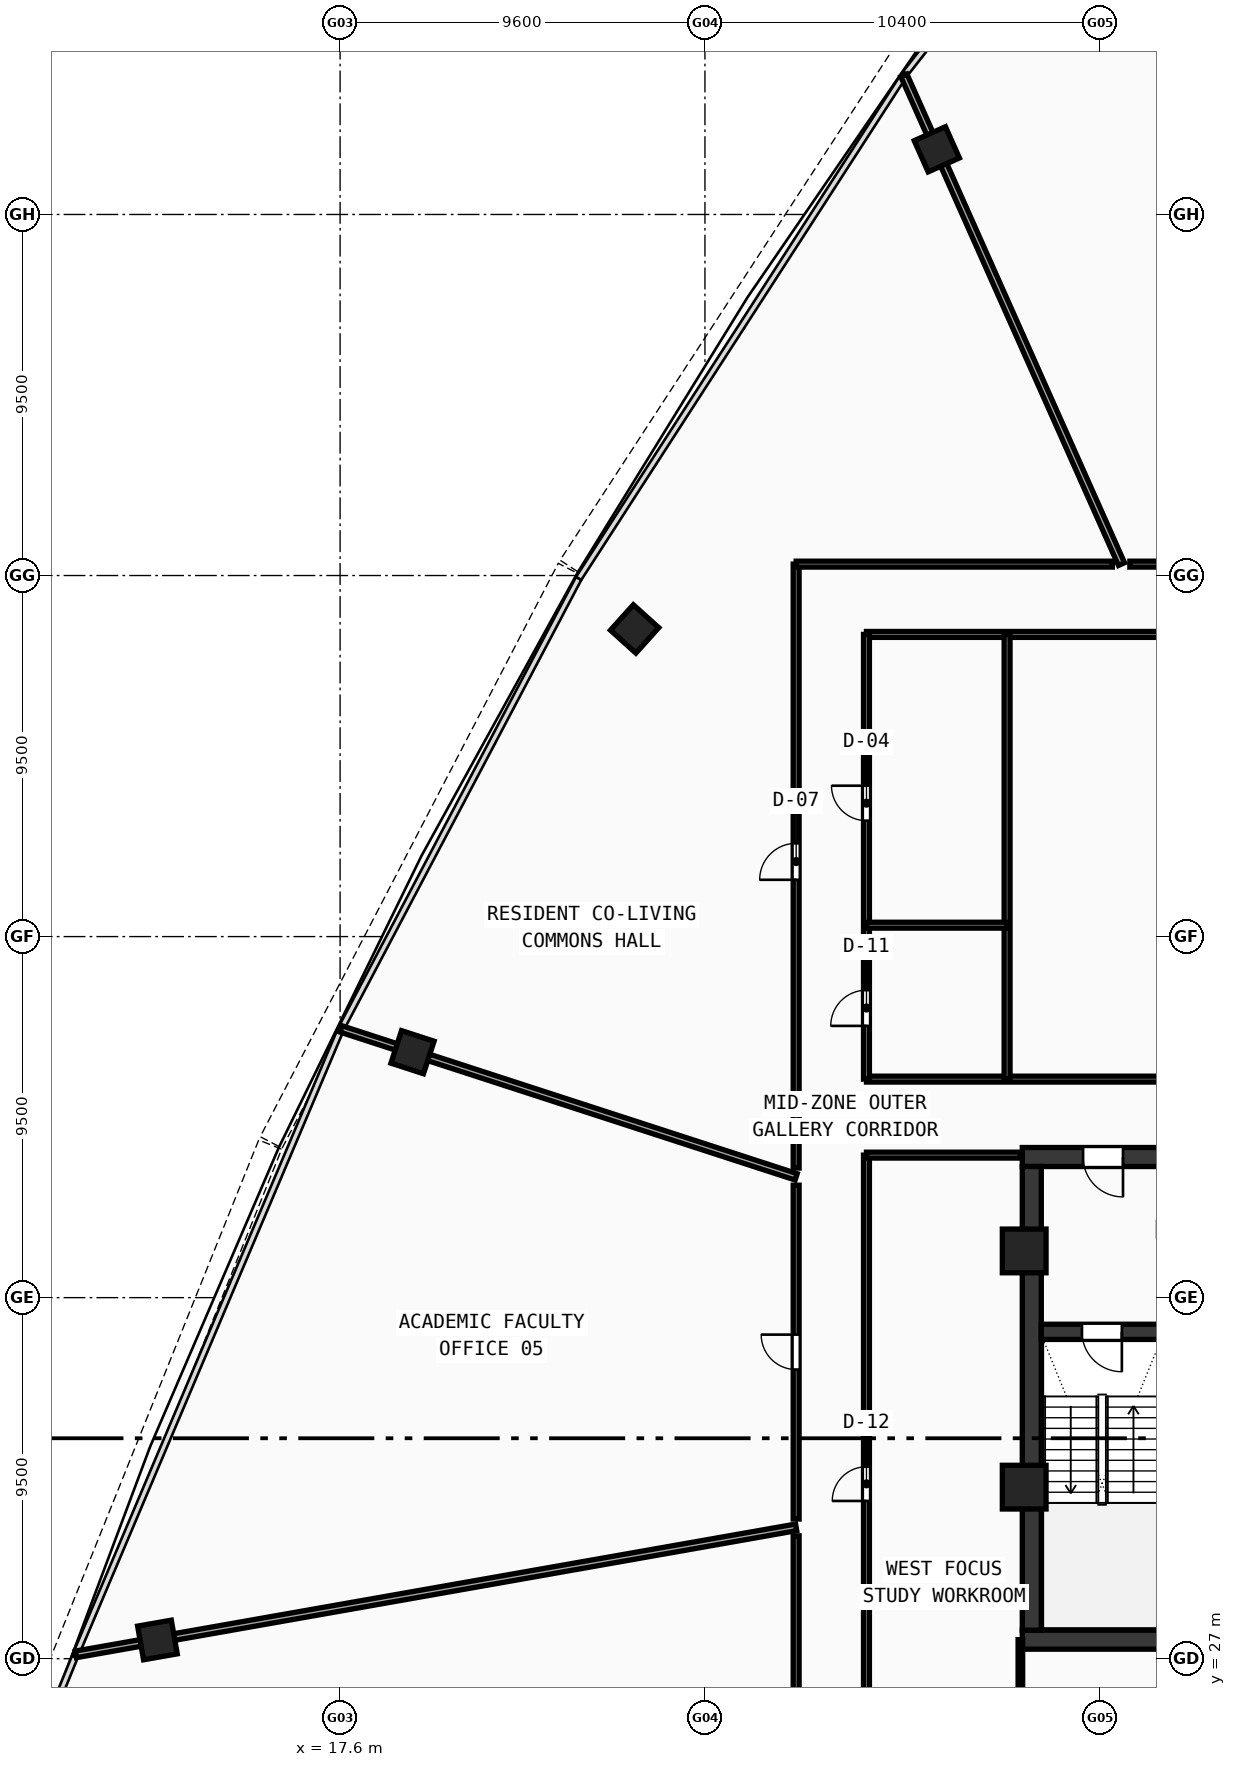
"""IFC4 building model, lengths in metres.
Left out: names, types, materials, properties, quantities, classifications, styles, units other than length and angle.
Written with IfcOpenShell. Run it as: python <this file> out.ifc"""

import sys

from ifc_helpers import new_model, si_unit, direction, frame, frame_2d, origin, origin_with_axes, origin_2d, place, context, subcontext, project, spatial, rectangle, hollow_rectangle, extrude, source, transform, mapped, element, fill, save


model = new_model("IFC4")
c1 = context("Model", 3, precision=1e-05, world=origin(), true_north=direction((0.0, 1.0)))
c2 = subcontext(c1, "Body", "Model", "MODEL_VIEW")
j1 = project(units=[si_unit("LENGTHUNIT", "METRE"), si_unit("PLANEANGLEUNIT", "RADIAN")], contexts=[c1])
p1 = place(None, origin())
s1 = spatial("IfcSite", under=j1, at=p1, CompositionType="ELEMENT")
p2 = place(p1, origin())
s2 = spatial("IfcBuilding", under=s1, at=p2, CompositionType="ELEMENT")
p3 = place(p2, frame((0.0, 0.0, 199.96)))
s3 = spatial("IfcBuildingStorey", under=s2, at=p3, CompositionType="ELEMENT", Elevation=199.96)
p4 = place(p3, frame((35.55, 27.5, 0.0), z_axis=(0.0, 0.0, 1.0), x_axis=(1.0, 0.0, 0.0)))
e1 = element("IfcWall", 1, at=p4, inside=s3, PredefinedType="SHEAR", context=c2, shape_type="SweptSolid", body=[
    extrude(rectangle(XDim=24.9, YDim=0.5, at=frame_2d((12.45, 0.0))), origin(), (0.0, 0.0, 1.0), 3.54),
])
p5 = place(p3, frame((35.55, 40.2, 0.0), z_axis=(0.0, 0.0, 1.0), x_axis=(1.0, 0.0, 0.0)))
e2 = element("IfcWall", 2, at=p5, inside=s3, PredefinedType="SHEAR", context=c2, shape_type="SweptSolid", body=[
    extrude(rectangle(XDim=11.25, YDim=0.5, at=frame_2d((5.625, 0.0))), origin(), (0.0, 0.0, 1.0), 3.54),
])
p6 = place(p5, frame((1.6, 0.0, 0.0)))
e3 = element("IfcOpeningElement", 3, at=p6, cuts=e2, PredefinedType="OPENING", context=c2, shape_type="SweptSolid", body=[
    extrude(rectangle(XDim=1.05, YDim=2.1, at=frame_2d((0.525, 1.05))), frame((0.0, 0.26, 0.0), z_axis=(0.0, -1.0, 0.0), x_axis=(1.0, 0.0, 0.0)), (0.0, 0.0, 1.0), 0.52),
])
p7 = place(p3, frame((35.8, 27.75, 0.0), z_axis=(0.0, 0.0, 1.0), x_axis=(0.0, 1.0, 0.0)))
e4 = element("IfcWall", 4, at=p7, inside=s3, PredefinedType="SHEAR", context=c2, shape_type="SweptSolid", body=[
    extrude(rectangle(XDim=12.2, YDim=0.5, at=frame_2d((6.1, 0.0))), origin(), (0.0, 0.0, 1.0), 3.54),
])
p8 = place(p3, frame((36.05, 35.6, 0.0), z_axis=(0.0, 0.0, 1.0), x_axis=(1.0, 0.0, 0.0)))
e5 = element("IfcWall", 5, at=p8, inside=s3, PredefinedType="SHEAR", context=c2, shape_type="SweptSolid", body=[
    extrude(rectangle(XDim=3.15, YDim=0.4, at=frame_2d((1.575, 0.0))), origin(), (0.0, 0.0, 1.0), 3.54),
])
p9 = place(p8, frame((1.07, 0.0, 0.0)))
e6 = element("IfcOpeningElement", 6, at=p9, cuts=e5, PredefinedType="OPENING", context=c2, shape_type="SweptSolid", body=[
    extrude(rectangle(XDim=1.05, YDim=2.1, at=frame_2d((0.525, 1.05))), frame((0.0, 0.21, 0.0), z_axis=(0.0, -1.0, 0.0), x_axis=(1.0, 0.0, 0.0)), (0.0, 0.0, 1.0), 0.42),
])
m1 = source(origin(), c2, "Body", "SweptSolid", [
    extrude(hollow_rectangle(XDim=1.15, YDim=1.15, WallThickness=0.048, at=origin_2d()), origin(), (0.0, 0.0, 1.0), 3.8),
])
for number, where, z_axis, x_axis in (
    (7, (35.6, 37.729, -0.26), (0.0, 0.0, 1.0), (1.0, 0.0, 0.0)),
    (8, (35.6, 31.513, -0.26), (0.0, 0.0, 1.0), (1.0, 0.0, 0.0)),
):
    element("IfcColumn", number, at=place(p3, frame(where, z_axis=z_axis, x_axis=x_axis)), inside=s3, PredefinedType="COLUMN", context=c2, shape_type="MappedRepresentation", body=[
        mapped(m1, transform((0.0, 0.0, 0.0), scale=1.0)),
    ])
m2 = source(origin(), c2, "Body", "SweptSolid", [
    extrude(hollow_rectangle(XDim=0.9, YDim=0.9, WallThickness=0.036, at=origin_2d()), origin(), (0.0, 0.0, 1.0), 3.8),
])
for number, where, z_axis, x_axis in (
    (9, (33.301, 66.715, -0.26), (0.0, 0.0, 1.0), (-0.914, -0.407, 0.0)),
    (10, (25.349, 54.095, -0.26), (0.0, 0.0, 1.0), (-0.669, -0.743, 0.0)),
    (11, (19.505, 42.958, -0.26), (0.0, 0.0, 1.0), (-0.309, -0.951, 0.0)),
    (12, (12.793, 27.492, -0.26), (0.0, 0.0, 1.0), (0.174, -0.985, 0.0)),
):
    element("IfcColumn", number, at=place(p3, frame(where, z_axis=z_axis, x_axis=x_axis)), inside=s3, PredefinedType="COLUMN", context=c2, shape_type="MappedRepresentation", body=[
        mapped(m2, transform((0.0, 0.0, 0.0), scale=1.0)),
    ])
p10 = place(p3, frame((31.45, 42.25, 0.0), z_axis=(0.0, 0.0, 1.0), x_axis=(1.0, 0.0, 0.0)))
e13 = element("IfcWall", 13, at=p10, inside=s3, PredefinedType="PARTITIONING", context=c2, shape_type="SweptSolid", body=[
    extrude(rectangle(XDim=33.1, YDim=0.155, at=frame_2d((16.55, 0.0))), origin(), (0.0, 0.0, 1.0), 2.89),
])
p11 = place(p3, frame((31.45, 53.95, 0.0), z_axis=(0.0, 0.0, 1.0), x_axis=(1.0, 0.0, 0.0)))
e14 = element("IfcWall", 14, at=p11, inside=s3, PredefinedType="PARTITIONING", context=c2, shape_type="SweptSolid", body=[
    extrude(rectangle(XDim=33.1, YDim=0.155, at=frame_2d((16.55, 0.0))), origin(), (0.0, 0.0, 1.0), 2.89),
])
p12 = place(p11, frame((8.0, 0.0, 0.0)))
e15 = element("IfcOpeningElement", 15, at=p12, cuts=e14, PredefinedType="OPENING", context=c2, shape_type="SweptSolid", body=[
    extrude(rectangle(XDim=0.92, YDim=2.1, at=frame_2d((0.46, 1.05))), frame((0.0, 0.087, 0.0), z_axis=(0.0, -1.0, 0.0), x_axis=(1.0, 0.0, 0.0)), (0.0, 0.0, 1.0), 0.175),
])
p13 = place(p11, frame((26.05, 0.0, 0.0)))
e16 = element("IfcOpeningElement", 16, at=p13, cuts=e14, PredefinedType="OPENING", context=c2, shape_type="SweptSolid", body=[
    extrude(rectangle(XDim=0.92, YDim=2.1, at=frame_2d((0.46, 1.05))), frame((0.0, 0.087, 0.0), z_axis=(0.0, -1.0, 0.0), x_axis=(1.0, 0.0, 0.0)), (0.0, 0.0, 1.0), 0.175),
])
p14 = place(p3, frame((31.45, 42.25, 0.0), z_axis=(0.0, 0.0, 1.0), x_axis=(0.0, 1.0, 0.0)))
e17 = element("IfcWall", 17, at=p14, inside=s3, PredefinedType="PARTITIONING", context=c2, shape_type="SweptSolid", body=[
    extrude(rectangle(XDim=11.7, YDim=0.155, at=frame_2d((5.85, 0.0))), origin(), (0.0, 0.0, 1.0), 2.89),
])
p15 = place(p14, frame((1.4, 0.0, 0.0)))
e18 = element("IfcOpeningElement", 18, at=p15, cuts=e17, PredefinedType="OPENING", context=c2, shape_type="SweptSolid", body=[
    extrude(rectangle(XDim=0.94, YDim=2.1, at=frame_2d((0.47, 1.05))), frame((0.0, 0.087, 0.0), z_axis=(0.0, -1.0, 0.0), x_axis=(1.0, 0.0, 0.0)), (0.0, 0.0, 1.0), 0.175),
])
p16 = place(p14, frame((6.8, 0.0, 0.0)))
e19 = element("IfcOpeningElement", 19, at=p16, cuts=e17, PredefinedType="OPENING", context=c2, shape_type="SweptSolid", body=[
    extrude(rectangle(XDim=0.92, YDim=2.1, at=frame_2d((0.46, 1.05))), frame((0.0, 0.087, 0.0), z_axis=(0.0, -1.0, 0.0), x_axis=(1.0, 0.0, 0.0)), (0.0, 0.0, 1.0), 0.175),
])
p17 = place(p3, frame((35.15, 42.25, 0.0), z_axis=(0.0, 0.0, 1.0), x_axis=(0.0, 1.0, 0.0)))
e20 = element("IfcWall", 20, at=p17, inside=s3, PredefinedType="PARTITIONING", context=c2, shape_type="SweptSolid", body=[
    extrude(rectangle(XDim=11.7, YDim=0.155, at=frame_2d((5.85, 0.0))), origin(), (0.0, 0.0, 1.0), 2.89),
])
p18 = place(p3, frame((31.45, 46.3, 0.0), z_axis=(0.0, 0.0, 1.0), x_axis=(1.0, 0.0, 0.0)))
e21 = element("IfcWall", 21, at=p18, inside=s3, PredefinedType="PARTITIONING", context=c2, shape_type="SweptSolid", body=[
    extrude(rectangle(XDim=3.7, YDim=0.155, at=frame_2d((1.85, 0.0))), origin(), (0.0, 0.0, 1.0), 2.89),
])
p19 = place(p3, frame((31.45, 23.65, 0.0), z_axis=(0.0, 0.0, 1.0), x_axis=(0.0, 1.0, 0.0)))
e22 = element("IfcWall", 22, at=p19, inside=s3, PredefinedType="PARTITIONING", context=c2, shape_type="SweptSolid", body=[
    extrude(rectangle(XDim=16.6, YDim=0.155, at=frame_2d((8.3, 0.0))), origin(), (0.0, 0.0, 1.0), 2.89),
])
p20 = place(p19, frame((7.5, 0.0, 0.0)))
e23 = element("IfcOpeningElement", 23, at=p20, cuts=e22, PredefinedType="OPENING", context=c2, shape_type="SweptSolid", body=[
    extrude(rectangle(XDim=0.9, YDim=2.08, at=frame_2d((0.45, 1.04))), frame((0.0, 0.087, 0.0), z_axis=(0.0, -1.0, 0.0), x_axis=(1.0, 0.0, 0.0)), (0.0, 0.0, 1.0), 0.175),
])
p21 = place(p3, frame((31.45, 40.25, 0.0), z_axis=(0.0, 0.0, 1.0), x_axis=(1.0, 0.0, 0.0)))
e24 = element("IfcWall", 24, at=p21, inside=s3, PredefinedType="PARTITIONING", context=c2, shape_type="SweptSolid", body=[
    extrude(rectangle(XDim=4.05, YDim=0.155, at=frame_2d((2.025, 0.0))), origin(), (0.0, 0.0, 1.0), 3.54),
])
p22 = place(p3, frame((35.5, 23.65, 0.0), z_axis=(0.0, 0.0, 1.0), x_axis=(0.0, 1.0, 0.0)))
e25 = element("IfcWall", 25, at=p22, inside=s3, PredefinedType="PARTITIONING", context=c2, shape_type="SweptSolid", body=[
    extrude(rectangle(XDim=3.85, YDim=0.12, at=frame_2d((1.925, 0.0))), origin(), (0.0, 0.0, 1.0), 3.14),
])
p23 = place(p3, frame((38.16, 55.8, 0.0), z_axis=(0.0, 0.0, 1.0), x_axis=(-0.406725691424, 0.913550333554, 0.0)))
e26 = element("IfcWall", 26, at=p23, inside=s3, PredefinedType="PARTITIONING", context=c2, shape_type="SweptSolid", body=[
    extrude(rectangle(XDim=14.078, YDim=0.175, at=frame_2d((7.039, 0.0))), origin(), (0.0, 0.0, 1.0), 2.89),
])
p24 = place(p3, frame((29.6, 39.678, 0.0), z_axis=(0.0, 0.0, 1.0), x_axis=(-0.951056149915, 0.309018121975, 0.0)))
e27 = element("IfcWall", 27, at=p24, inside=s3, PredefinedType="PARTITIONING", context=c2, shape_type="SweptSolid", body=[
    extrude(rectangle(XDim=12.593, YDim=0.175, at=frame_2d((6.296, 0.0))), origin(), (0.0, 0.0, 1.0), 2.89),
])
p25 = place(p3, frame((29.6, 30.456, 0.0), z_axis=(0.0, 0.0, 1.0), x_axis=(-0.984807685374, -0.173648561263, 0.0)))
e28 = element("IfcWall", 28, at=p25, inside=s3, PredefinedType="PARTITIONING", context=c2, shape_type="SweptSolid", body=[
    extrude(rectangle(XDim=19.246, YDim=0.175, at=frame_2d((9.623, 0.0))), origin(), (0.0, 0.0, 1.0), 2.89),
])
p26 = place(p3, frame((29.6, 21.8, 0.0), z_axis=(0.0, 0.0, 1.0), x_axis=(0.0, 1.0, 0.0)))
e29 = element("IfcWall", 29, at=p26, inside=s3, PredefinedType="PARTITIONING", context=c2, shape_type="SweptSolid", body=[
    extrude(rectangle(XDim=8.432, YDim=0.155, at=frame_2d((4.216, 0.0))), origin(), (0.0, 0.0, 1.0), 3.14),
])
p27 = place(p3, frame((29.6, 30.675, 0.0), z_axis=(0.0, 0.0, 1.0), x_axis=(0.0, 1.0, 0.0)))
e30 = element("IfcWall", 30, at=p27, inside=s3, PredefinedType="PARTITIONING", context=c2, shape_type="SweptSolid", body=[
    extrude(rectangle(XDim=8.783, YDim=0.155, at=frame_2d((4.392, 0.0))), origin(), (0.0, 0.0, 1.0), 3.14),
])
p28 = place(p27, frame((3.932, 0.0, 0.0)))
e31 = element("IfcOpeningElement", 31, at=p28, cuts=e30, PredefinedType="OPENING", context=c2, shape_type="SweptSolid", body=[
    extrude(rectangle(XDim=0.92, YDim=2.1, at=frame_2d((0.46, 1.05))), frame((0.0, 0.087, 0.0), z_axis=(0.0, -1.0, 0.0), x_axis=(1.0, 0.0, 0.0)), (0.0, 0.0, 1.0), 0.175),
])
p29 = place(p3, frame((29.6, 39.91, 0.0), z_axis=(0.0, 0.0, 1.0), x_axis=(0.0, 1.0, 0.0)))
e32 = element("IfcWall", 32, at=p29, inside=s3, PredefinedType="PARTITIONING", context=c2, shape_type="SweptSolid", body=[
    extrude(rectangle(XDim=15.89, YDim=0.155, at=frame_2d((7.945, 0.0))), origin(), (0.0, 0.0, 1.0), 2.89),
])
p30 = place(p29, frame((7.584, 0.0, 0.0)))
e33 = element("IfcOpeningElement", 33, at=p30, cuts=e32, PredefinedType="OPENING", context=c2, shape_type="SweptSolid", body=[
    extrude(rectangle(XDim=0.96, YDim=2.12, at=frame_2d((0.48, 1.06))), frame((0.0, 0.087, 0.0), z_axis=(0.0, -1.0, 0.0), x_axis=(1.0, 0.0, 0.0)), (0.0, 0.0, 1.0), 0.175),
])
p31 = place(p3, frame((29.6, 55.8, 0.0), z_axis=(0.0, 0.0, 1.0), x_axis=(1.0, 0.0, 0.0)))
e34 = element("IfcWall", 34, at=p31, inside=s3, PredefinedType="PARTITIONING", context=c2, shape_type="SweptSolid", body=[
    extrude(rectangle(XDim=8.32, YDim=0.155, at=frame_2d((4.16, 0.0))), origin(), (0.0, 0.0, 1.0), 3.14),
])
p32 = place(p3, frame((38.38, 55.8, 0.0), z_axis=(0.0, 0.0, 1.0), x_axis=(1.0, 0.0, 0.0)))
e35 = element("IfcWall", 35, at=p32, inside=s3, PredefinedType="PARTITIONING", context=c2, shape_type="SweptSolid", body=[
    extrude(rectangle(XDim=5.329, YDim=0.155, at=frame_2d((2.665, 0.0))), origin(), (0.0, 0.0, 1.0), 2.89),
])
p33 = place(p32, frame((2.13, 0.0, 0.0)))
e36 = element("IfcOpeningElement", 36, at=p33, cuts=e35, PredefinedType="OPENING", context=c2, shape_type="SweptSolid", body=[
    extrude(rectangle(XDim=0.92, YDim=2.1, at=frame_2d((0.46, 1.05))), frame((0.0, 0.087, 0.0), z_axis=(0.0, -1.0, 0.0), x_axis=(1.0, 0.0, 0.0)), (0.0, 0.0, 1.0), 0.175),
])
m3 = source(origin(), c2, "Body", "SweptSolid", [
    extrude(rectangle(XDim=1.05, YDim=2.1, at=frame_2d((0.525, 1.05))), frame((0.0, 0.025, 0.0), z_axis=(0.0, -1.0, 0.0), x_axis=(1.0, 0.0, 0.0)), (0.0, 0.0, 1.0), 0.05),
])
p34 = place(p9, frame((1.05, 0.0, 0.0), z_axis=(0.0, 0.0, 1.0), x_axis=(-1.0, 0.0, 0.0)))
e37 = element("IfcDoor", 37, at=p34, inside=s3, OperationType="SINGLE_SWING_LEFT", PredefinedType="DOOR", context=c2, shape_type="MappedRepresentation", body=[
    mapped(m3, transform((0.0, 0.0, 0.0), scale=1.0)),
])
fill(e6, e37)
p35 = place(p6, frame((1.05, 0.0, 0.0), z_axis=(0.0, 0.0, 1.0), x_axis=(-1.0, 0.0, 0.0)))
e38 = element("IfcDoor", 38, at=p35, inside=s3, OperationType="SINGLE_SWING_LEFT", PredefinedType="DOOR", context=c2, shape_type="MappedRepresentation", body=[
    mapped(m3, transform((0.0, 0.0, 0.0), scale=1.0)),
])
fill(e3, e38)
m4 = source(origin(), c2, "Body", "SweptSolid", [
    extrude(rectangle(XDim=0.94, YDim=2.1, at=frame_2d((0.47, 1.05))), frame((0.0, 0.025, 0.0), z_axis=(0.0, -1.0, 0.0), x_axis=(1.0, 0.0, 0.0)), (0.0, 0.0, 1.0), 0.05),
])
p36 = place(p15, origin_with_axes())
e39 = element("IfcDoor", 39, at=p36, inside=s3, OperationType="SINGLE_SWING_LEFT", PredefinedType="DOOR", context=c2, shape_type="MappedRepresentation", body=[
    mapped(m4, transform((0.0, 0.0, 0.0), scale=1.0)),
])
fill(e18, e39)
m5 = source(origin(), c2, "Body", "SweptSolid", [
    extrude(rectangle(XDim=0.92, YDim=2.1, at=frame_2d((0.46, 1.05))), frame((0.0, 0.025, 0.0), z_axis=(0.0, -1.0, 0.0), x_axis=(1.0, 0.0, 0.0)), (0.0, 0.0, 1.0), 0.05),
])
p37 = place(p16, origin_with_axes())
e40 = element("IfcDoor", 40, at=p37, inside=s3, OperationType="SINGLE_SWING_RIGHT", PredefinedType="DOOR", context=c2, shape_type="MappedRepresentation", body=[
    mapped(m5, transform((0.0, 0.0, 0.0), scale=1.0)),
])
fill(e19, e40)
m6 = source(origin(), c2, "Body", "SweptSolid", [
    extrude(rectangle(XDim=0.9, YDim=2.08, at=frame_2d((0.45, 1.04))), frame((0.0, 0.025, 0.0), z_axis=(0.0, -1.0, 0.0), x_axis=(1.0, 0.0, 0.0)), (0.0, 0.0, 1.0), 0.05),
])
p38 = place(p20, origin_with_axes())
e41 = element("IfcDoor", 41, at=p38, inside=s3, OperationType="SINGLE_SWING_LEFT", PredefinedType="DOOR", context=c2, shape_type="MappedRepresentation", body=[
    mapped(m6, transform((0.0, 0.0, 0.0), scale=1.0)),
])
fill(e23, e41)
m7 = source(origin(), c2, "Body", "SweptSolid", [
    extrude(rectangle(XDim=0.96, YDim=2.12, at=frame_2d((0.48, 1.06))), frame((0.0, 0.025, 0.0), z_axis=(0.0, -1.0, 0.0), x_axis=(1.0, 0.0, 0.0)), (0.0, 0.0, 1.0), 0.05),
])
p39 = place(p30, origin_with_axes())
e42 = element("IfcDoor", 42, at=p39, inside=s3, OperationType="SINGLE_SWING_LEFT", PredefinedType="DOOR", context=c2, shape_type="MappedRepresentation", body=[
    mapped(m7, transform((0.0, 0.0, 0.0), scale=1.0)),
])
fill(e33, e42)
p40 = place(p28, origin_with_axes())
e43 = element("IfcDoor", 43, at=p40, inside=s3, OperationType="SINGLE_SWING_RIGHT", PredefinedType="DOOR", context=c2, shape_type="MappedRepresentation", body=[
    mapped(m5, transform((0.0, 0.0, 0.0), scale=1.0)),
])
fill(e31, e43)
save(model, sys.argv[1])
